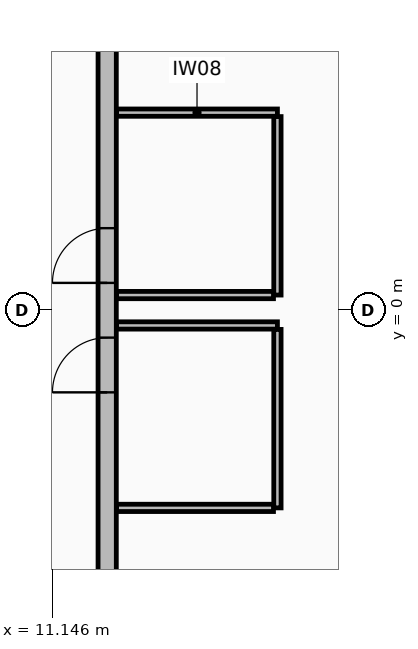
"""IFC4 building model, lengths in metres.
Left out: names, types, materials, properties, quantities, classifications, styles, units other than length and angle.
Written with IfcOpenShell. Run it as: python <this file> out.ifc"""

import sys

from ifc_helpers import new_model, si_unit, direction, frame, frame_2d, origin, place, context, subcontext, project, spatial, rectangle, extrude, element, fill, save


model = new_model("IFC4")
c1 = context("Model", 3, precision=1e-05, world=origin(), true_north=direction((0.0, 1.0)))
c2 = subcontext(c1, "Body", "Model", "MODEL_VIEW")
j1 = project(units=[si_unit("LENGTHUNIT", "METRE"), si_unit("PLANEANGLEUNIT", "RADIAN")], contexts=[c1])
p1 = place(None, origin())
s1 = spatial("IfcSite", under=j1, at=p1, CompositionType="ELEMENT")
p2 = place(p1, origin())
s2 = spatial("IfcBuilding", under=s1, at=p2, CompositionType="ELEMENT")
p3 = place(p2, frame((0.0, 0.0, 81.1)))
s3 = spatial("IfcBuildingStorey", under=s2, at=p3, CompositionType="ELEMENT", Elevation=81.1)
p4 = place(p3, frame((12.05, -10.75, 0.0), z_axis=(0.0, 0.0, 1.0), x_axis=(0.0, 1.0, 0.0)))
e1 = element("IfcWall", 1, at=p4, inside=s3, PredefinedType="STANDARD", context=c2, shape_type="SweptSolid", body=[
    extrude(rectangle(XDim=21.5, YDim=0.3, at=frame_2d((10.75, 0.0))), origin(), (0.0, 0.0, 1.0), 2.505),
])
p5 = place(p4, frame((11.2, 0.0, 0.0)))
e2 = element("IfcOpeningElement", 2, at=p5, cuts=e1, PredefinedType="OPENING", context=c2, shape_type="SweptSolid", body=[
    extrude(rectangle(XDim=0.9, YDim=2.1, at=frame_2d((0.45, 1.05))), frame((0.0, 0.16, 0.0), z_axis=(0.0, -1.0, 0.0), x_axis=(1.0, 0.0, 0.0)), (0.0, 0.0, 1.0), 0.32),
])
p6 = place(p4, frame((9.4, 0.0, 0.0)))
e3 = element("IfcOpeningElement", 3, at=p6, cuts=e1, PredefinedType="OPENING", context=c2, shape_type="SweptSolid", body=[
    extrude(rectangle(XDim=0.9, YDim=2.1, at=frame_2d((0.45, 1.05))), frame((0.0, 0.16, 0.0), z_axis=(0.0, -1.0, 0.0), x_axis=(1.0, 0.0, 0.0)), (0.0, 0.0, 1.0), 0.32),
])
p7 = place(p3, frame((12.205, 3.25, 0.0), z_axis=(0.0, 0.0, 1.0), x_axis=(1.0, 0.0, 0.0)))
e4 = element("IfcWall", 4, at=p7, inside=s3, PredefinedType="PARTITIONING", context=c2, shape_type="SweptSolid", body=[
    extrude(rectangle(XDim=2.645, YDim=0.12, at=frame_2d((1.323, 0.0))), origin(), (0.0, 0.0, 1.0), 4.405),
])
p8 = place(p3, frame((14.85, 3.185, 0.0), z_axis=(0.0, 0.0, 1.0), x_axis=(0.0, -1.0, 0.0)))
e5 = element("IfcWall", 5, at=p8, inside=s3, PredefinedType="PARTITIONING", context=c2, shape_type="SweptSolid", body=[
    extrude(rectangle(XDim=2.935, YDim=0.12, at=frame_2d((1.468, 0.0))), origin(), (0.0, 0.0, 1.0), 4.405),
])
p9 = place(p3, frame((14.785, 0.25, 0.0), z_axis=(0.0, 0.0, 1.0), x_axis=(-1.0, 0.0, 0.0)))
e6 = element("IfcWall", 6, at=p9, inside=s3, PredefinedType="PARTITIONING", context=c2, shape_type="SweptSolid", body=[
    extrude(rectangle(XDim=2.58, YDim=0.12, at=frame_2d((1.29, 0.0))), origin(), (0.0, 0.0, 1.0), 4.81),
])
p10 = place(p3, frame((12.205, -0.25, 0.0), z_axis=(0.0, 0.0, 1.0), x_axis=(1.0, 0.0, 0.0)))
e7 = element("IfcWall", 7, at=p10, inside=s3, PredefinedType="PARTITIONING", context=c2, shape_type="SweptSolid", body=[
    extrude(rectangle(XDim=2.645, YDim=0.12, at=frame_2d((1.323, 0.0))), origin(), (0.0, 0.0, 1.0), 4.81),
])
p11 = place(p3, frame((14.85, -0.315, 0.0), z_axis=(0.0, 0.0, 1.0), x_axis=(0.0, -1.0, 0.0)))
e8 = element("IfcWall", 8, at=p11, inside=s3, PredefinedType="PARTITIONING", context=c2, shape_type="SweptSolid", body=[
    extrude(rectangle(XDim=2.935, YDim=0.12, at=frame_2d((1.468, 0.0))), origin(), (0.0, 0.0, 1.0), 4.81),
])
p12 = place(p3, frame((14.785, -3.25, 0.0), z_axis=(0.0, 0.0, 1.0), x_axis=(-1.0, 0.0, 0.0)))
e9 = element("IfcWall", 9, at=p12, inside=s3, PredefinedType="PARTITIONING", context=c2, shape_type="SweptSolid", body=[
    extrude(rectangle(XDim=2.58, YDim=0.12, at=frame_2d((1.29, 0.0))), origin(), (0.0, 0.0, 1.0), 4.81),
])
p13 = place(p5, origin())
e10 = element("IfcDoor", 10, at=p13, inside=s3, OperationType="SINGLE_SWING_LEFT", PredefinedType="DOOR", context=c2, shape_type="SweptSolid", body=[
    extrude(rectangle(XDim=0.9, YDim=2.1, at=frame_2d((0.45, 1.05))), frame((0.0, 0.025, 0.0), z_axis=(0.0, -1.0, 0.0), x_axis=(1.0, 0.0, 0.0)), (0.0, 0.0, 1.0), 0.05),
])
fill(e2, e10)
p14 = place(p6, origin())
e11 = element("IfcDoor", 11, at=p14, inside=s3, OperationType="SINGLE_SWING_LEFT", PredefinedType="DOOR", context=c2, shape_type="SweptSolid", body=[
    extrude(rectangle(XDim=0.9, YDim=2.1, at=frame_2d((0.45, 1.05))), frame((0.0, 0.025, 0.0), z_axis=(0.0, -1.0, 0.0), x_axis=(1.0, 0.0, 0.0)), (0.0, 0.0, 1.0), 0.05),
])
fill(e3, e11)
save(model, sys.argv[1])
